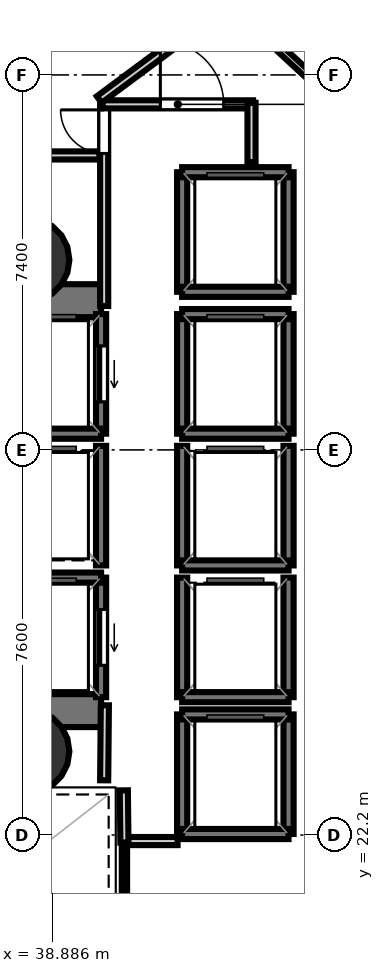
"""IFC4 building model, lengths in metres.
Left out: names, types, materials, properties, quantities, classifications, styles, units other than length and angle.
Written with IfcOpenShell. Run it as: python <this file> out.ifc"""

import sys

from ifc_helpers import new_model, si_unit, direction, frame, frame_2d, origin, origin_2d, place, context, subcontext, project, spatial, rectangle, hollow_circle, extrude, element, fill, save


model = new_model("IFC4")
c1 = context("Model", 3, precision=1e-05, world=origin(), true_north=direction((0.0, 1.0)))
c2 = subcontext(c1, "Body", "Model", "MODEL_VIEW")
j1 = project(units=[si_unit("LENGTHUNIT", "METRE"), si_unit("PLANEANGLEUNIT", "RADIAN")], contexts=[c1])
p1 = place(None, origin())
s1 = spatial("IfcSite", under=j1, at=p1, CompositionType="ELEMENT")
p2 = place(p1, origin())
s2 = spatial("IfcBuilding", under=s1, at=p2, CompositionType="ELEMENT")
p3 = place(p2, frame((0.0, 0.0, 67.3)))
s3 = spatial("IfcBuildingStorey", under=s2, at=p3, CompositionType="ELEMENT", Elevation=67.3)
p4 = place(p3, frame((29.13, 32.745, 0.0), z_axis=(0.0, 0.0, 1.0), x_axis=(1.0, 0.0, 0.0)))
e1 = element("IfcWall", 1, at=p4, inside=s3, PredefinedType="SHEAR", context=c2, shape_type="SweptSolid", body=[
    extrude(rectangle(XDim=10.72, YDim=0.65, at=frame_2d((5.36, 0.0))), origin(), (0.0, 0.0, 1.0), 3.52),
])
p5 = place(p4, frame((1.095, 0.0, 0.0)))
e2 = element("IfcOpeningElement", 2, at=p5, cuts=e1, PredefinedType="OPENING", context=c2, shape_type="SweptSolid", body=[
    extrude(rectangle(XDim=1.25, YDim=2.15, at=frame_2d((0.625, 1.075))), frame((0.0, 0.335, 0.0), z_axis=(0.0, -1.0, 0.0), x_axis=(1.0, 0.0, 0.0)), (0.0, 0.0, 1.0), 0.67),
])
p6 = place(p3, frame((29.13, 24.655, 0.0), z_axis=(0.0, 0.0, 1.0), x_axis=(1.0, 0.0, 0.0)))
e3 = element("IfcWall", 3, at=p6, inside=s3, PredefinedType="SHEAR", context=c2, shape_type="SweptSolid", body=[
    extrude(rectangle(XDim=10.72, YDim=0.65, at=frame_2d((5.36, 0.0))), origin(), (0.0, 0.0, 1.0), 3.52),
])
p7 = place(p6, frame((0.895, 0.0, 0.0)))
e4 = element("IfcOpeningElement", 4, at=p7, cuts=e3, PredefinedType="OPENING", context=c2, shape_type="SweptSolid", body=[
    extrude(rectangle(XDim=1.25, YDim=2.15, at=frame_2d((0.625, 1.075))), frame((0.0, 0.335, 0.0), z_axis=(0.0, -1.0, 0.0), x_axis=(1.0, 0.0, 0.0)), (0.0, 0.0, 1.0), 0.67),
])
for number, where, z_axis, x_axis in (
    (5, (38.4, 33.55, 0.0), (0.0, 0.0, 1.0), (1.0, 0.0, 0.0)),
    (6, (38.4, 23.85, 0.0), (0.0, 0.0, 1.0), (1.0, 0.0, 0.0)),
):
    element("IfcColumn", number, at=place(p3, frame(where, z_axis=z_axis, x_axis=x_axis)), inside=s3, PredefinedType="COLUMN", context=c2, shape_type="SweptSolid", body=[
        extrude(hollow_circle(Radius=0.825, WallThickness=0.04, at=origin_2d()), origin(), (0.0, 0.0, 1.0), 3.7),
    ])
p8 = place(p3, frame((39.85, 30.12, 0.0), z_axis=(0.0, 0.0, 1.0), x_axis=(0.0, 1.0, 0.0)))
e7 = element("IfcWall", 7, at=p8, inside=s3, PredefinedType="SOLIDWALL", context=c2, shape_type="SweptSolid", body=[
    extrude(rectangle(XDim=2.36, YDim=0.2, at=frame_2d((1.18, 0.0))), origin(), (0.0, 0.0, 1.0), 3.52),
])
p9 = place(p8, frame((0.63, 0.0, 0.0)))
e8 = element("IfcOpeningElement", 8, at=p9, cuts=e7, PredefinedType="OPENING", context=c2, shape_type="SweptSolid", body=[
    extrude(rectangle(XDim=1.1, YDim=2.15, at=frame_2d((0.55, 1.075))), frame((0.0, 0.11, 0.0), z_axis=(0.0, -1.0, 0.0), x_axis=(1.0, 0.0, 0.0)), (0.0, 0.0, 1.0), 0.22),
])
p10 = place(p3, frame((37.75, 30.12, 0.0), z_axis=(0.0, 0.0, 1.0), x_axis=(1.0, 0.0, 0.0)))
e9 = element("IfcWall", 9, at=p10, inside=s3, PredefinedType="SOLIDWALL", context=c2, shape_type="SweptSolid", body=[
    extrude(rectangle(XDim=2.1, YDim=0.2, at=frame_2d((1.05, 0.0))), origin(), (0.0, 0.0, 1.0), 3.52),
])
p11 = place(p3, frame((39.85, 24.92, 0.0), z_axis=(0.0, 0.0, 1.0), x_axis=(0.0, 1.0, 0.0)))
e10 = element("IfcWall", 10, at=p11, inside=s3, PredefinedType="SOLIDWALL", context=c2, shape_type="SweptSolid", body=[
    extrude(rectangle(XDim=2.36, YDim=0.2, at=frame_2d((1.18, 0.0))), origin(), (0.0, 0.0, 1.0), 3.52),
])
p12 = place(p11, frame((0.63, 0.0, 0.0)))
e11 = element("IfcOpeningElement", 11, at=p12, cuts=e10, PredefinedType="OPENING", context=c2, shape_type="SweptSolid", body=[
    extrude(rectangle(XDim=1.1, YDim=2.15, at=frame_2d((0.55, 1.075))), frame((0.0, 0.11, 0.0), z_axis=(0.0, -1.0, 0.0), x_axis=(1.0, 0.0, 0.0)), (0.0, 0.0, 1.0), 0.22),
])
p13 = place(p3, frame((37.75, 27.28, 0.0), z_axis=(0.0, 0.0, 1.0), x_axis=(1.0, 0.0, 0.0)))
e12 = element("IfcWall", 12, at=p13, inside=s3, PredefinedType="SOLIDWALL", context=c2, shape_type="SweptSolid", body=[
    extrude(rectangle(XDim=2.1, YDim=0.2, at=frame_2d((1.05, 0.0))), origin(), (0.0, 0.0, 1.0), 3.52),
])
for number, where, z_axis, x_axis in (
    (13, (43.55, 30.12, 0.0), (0.0, 0.0, 1.0), (0.0, 1.0, 0.0)),
    (14, (41.45, 30.12, 0.0), (0.0, 0.0, 1.0), (0.0, 1.0, 0.0)),
):
    element("IfcWall", number, at=place(p3, frame(where, z_axis=z_axis, x_axis=x_axis)), inside=s3, PredefinedType="SOLIDWALL", context=c2, shape_type="SweptSolid", body=[
        extrude(rectangle(XDim=2.36, YDim=0.2, at=frame_2d((1.18, 0.0))), origin(), (0.0, 0.0, 1.0), 3.52),
    ])
for number, where, z_axis, x_axis in (
    (15, (41.45, 32.48, 0.0), (0.0, 0.0, 1.0), (1.0, 0.0, 0.0)),
    (16, (41.45, 30.12, 0.0), (0.0, 0.0, 1.0), (1.0, 0.0, 0.0)),
):
    element("IfcWall", number, at=place(p3, frame(where, z_axis=z_axis, x_axis=x_axis)), inside=s3, PredefinedType="SOLIDWALL", context=c2, shape_type="SweptSolid", body=[
        extrude(rectangle(XDim=2.1, YDim=0.2, at=frame_2d((1.05, 0.0))), origin(), (0.0, 0.0, 1.0), 3.52),
    ])
for number, where, z_axis, x_axis in (
    (17, (43.55, 27.52, 0.0), (0.0, 0.0, 1.0), (0.0, 1.0, 0.0)),
    (18, (41.45, 27.52, 0.0), (0.0, 0.0, 1.0), (0.0, 1.0, 0.0)),
):
    element("IfcWall", number, at=place(p3, frame(where, z_axis=z_axis, x_axis=x_axis)), inside=s3, PredefinedType="SOLIDWALL", context=c2, shape_type="SweptSolid", body=[
        extrude(rectangle(XDim=2.36, YDim=0.2, at=frame_2d((1.18, 0.0))), origin(), (0.0, 0.0, 1.0), 3.52),
    ])
p14 = place(p3, frame((41.45, 27.52, 0.0), z_axis=(0.0, 0.0, 1.0), x_axis=(1.0, 0.0, 0.0)))
e19 = element("IfcWall", 19, at=p14, inside=s3, PredefinedType="SOLIDWALL", context=c2, shape_type="SweptSolid", body=[
    extrude(rectangle(XDim=2.1, YDim=0.2, at=frame_2d((1.05, 0.0))), origin(), (0.0, 0.0, 1.0), 3.52),
])
for number, where, z_axis, x_axis in (
    (20, (43.55, 24.92, 0.0), (0.0, 0.0, 1.0), (0.0, 1.0, 0.0)),
    (21, (41.45, 24.92, 0.0), (0.0, 0.0, 1.0), (0.0, 1.0, 0.0)),
):
    element("IfcWall", number, at=place(p3, frame(where, z_axis=z_axis, x_axis=x_axis)), inside=s3, PredefinedType="SOLIDWALL", context=c2, shape_type="SweptSolid", body=[
        extrude(rectangle(XDim=2.36, YDim=0.2, at=frame_2d((1.18, 0.0))), origin(), (0.0, 0.0, 1.0), 3.52),
    ])
p15 = place(p3, frame((41.45, 24.92, 0.0), z_axis=(0.0, 0.0, 1.0), x_axis=(1.0, 0.0, 0.0)))
e22 = element("IfcWall", 22, at=p15, inside=s3, PredefinedType="SOLIDWALL", context=c2, shape_type="SweptSolid", body=[
    extrude(rectangle(XDim=2.1, YDim=0.2, at=frame_2d((1.05, 0.0))), origin(), (0.0, 0.0, 1.0), 3.52),
])
p16 = place(p3, frame((39.85, 27.52, 0.0), z_axis=(0.0, 0.0, 1.0), x_axis=(0.0, 1.0, 0.0)))
e23 = element("IfcWall", 23, at=p16, inside=s3, PredefinedType="SOLIDWALL", context=c2, shape_type="SweptSolid", body=[
    extrude(rectangle(XDim=2.36, YDim=0.2, at=frame_2d((1.18, 0.0))), origin(), (0.0, 0.0, 1.0), 3.52),
])
for number, where, z_axis, x_axis in (
    (24, (43.55, 22.22, 0.0), (0.0, 0.0, 1.0), (0.0, 1.0, 0.0)),
    (25, (41.45, 22.22, 0.0), (0.0, 0.0, 1.0), (0.0, 1.0, 0.0)),
):
    element("IfcWall", number, at=place(p3, frame(where, z_axis=z_axis, x_axis=x_axis)), inside=s3, PredefinedType="SOLIDWALL", context=c2, shape_type="SweptSolid", body=[
        extrude(rectangle(XDim=2.36, YDim=0.2, at=frame_2d((1.18, 0.0))), origin(), (0.0, 0.0, 1.0), 3.52),
    ])
for number, where, z_axis, x_axis in (
    (26, (41.45, 24.58, 0.0), (0.0, 0.0, 1.0), (1.0, 0.0, 0.0)),
    (27, (41.45, 22.22, 0.0), (0.0, 0.0, 1.0), (1.0, 0.0, 0.0)),
):
    element("IfcWall", number, at=place(p3, frame(where, z_axis=z_axis, x_axis=x_axis)), inside=s3, PredefinedType="SOLIDWALL", context=c2, shape_type="SweptSolid", body=[
        extrude(rectangle(XDim=2.1, YDim=0.2, at=frame_2d((1.05, 0.0))), origin(), (0.0, 0.0, 1.0), 3.52),
    ])
for number, where, z_axis, x_axis in (
    (28, (43.55, 32.92, 0.0), (0.0, 0.0, 1.0), (0.0, 1.0, 0.0)),
    (29, (41.45, 32.92, 0.0), (0.0, 0.0, 1.0), (0.0, 1.0, 0.0)),
):
    element("IfcWall", number, at=place(p3, frame(where, z_axis=z_axis, x_axis=x_axis)), inside=s3, PredefinedType="SOLIDWALL", context=c2, shape_type="SweptSolid", body=[
        extrude(rectangle(XDim=2.36, YDim=0.2, at=frame_2d((1.18, 0.0))), origin(), (0.0, 0.0, 1.0), 3.52),
    ])
for number, where, z_axis, x_axis in (
    (30, (41.45, 35.28, 0.0), (0.0, 0.0, 1.0), (1.0, 0.0, 0.0)),
    (31, (41.45, 32.92, 0.0), (0.0, 0.0, 1.0), (1.0, 0.0, 0.0)),
):
    element("IfcWall", number, at=place(p3, frame(where, z_axis=z_axis, x_axis=x_axis)), inside=s3, PredefinedType="SOLIDWALL", context=c2, shape_type="SweptSolid", body=[
        extrude(rectangle(XDim=2.1, YDim=0.2, at=frame_2d((1.05, 0.0))), origin(), (0.0, 0.0, 1.0), 3.52),
    ])
p17 = place(p3, frame((39.911, 32.64, 0.0), z_axis=(0.0, 0.0, 1.0), x_axis=(0.0, 1.0, 0.0)))
e32 = element("IfcWall", 32, at=p17, inside=s3, PredefinedType="PARTITIONING", context=c2, shape_type="SweptSolid", body=[
    extrude(rectangle(XDim=4.01, YDim=0.16, at=frame_2d((2.005, 0.0))), origin(), (0.0, 0.0, 1.0), 2.84),
])
p18 = place(p17, frame((3.01, 0.0, 0.0)))
e33 = element("IfcOpeningElement", 33, at=p18, cuts=e32, PredefinedType="OPENING", context=c2, shape_type="SweptSolid", body=[
    extrude(rectangle(XDim=0.86, YDim=2.05, at=frame_2d((0.43, 1.025))), frame((0.0, 0.09, 0.0), z_axis=(0.0, -1.0, 0.0), x_axis=(1.0, 0.0, 0.0)), (0.0, 0.0, 1.0), 0.18),
])
p19 = place(p3, frame((39.88, 36.619, 0.0), z_axis=(0.0, 0.0, 1.0), x_axis=(1.0, 0.0, 0.0)))
e34 = element("IfcWall", 34, at=p19, inside=s3, PredefinedType="PARTITIONING", context=c2, shape_type="SweptSolid", body=[
    extrude(rectangle(XDim=2.97, YDim=0.16, at=frame_2d((1.485, 0.0))), origin(), (0.0, 0.0, 1.0), 2.798),
])
p20 = place(p19, frame((1.14, 0.0, 0.0)))
e35 = element("IfcOpeningElement", 35, at=p20, cuts=e34, PredefinedType="OPENING", context=c2, shape_type="SweptSolid", body=[
    extrude(rectangle(XDim=1.25, YDim=2.2, at=frame_2d((0.625, 1.1))), frame((0.0, 0.09, 0.0), z_axis=(0.0, -1.0, 0.0), x_axis=(1.0, 0.0, 0.0)), (0.0, 0.0, 1.0), 0.18),
])
p21 = place(p3, frame((42.819, 36.65, 0.0), z_axis=(0.0, 0.0, 1.0), x_axis=(0.0, -1.0, 0.0)))
e36 = element("IfcWall", 36, at=p21, inside=s3, PredefinedType="PARTITIONING", context=c2, shape_type="SweptSolid", body=[
    extrude(rectangle(XDim=1.17, YDim=0.16, at=frame_2d((0.585, 0.0))), origin(), (0.0, 0.0, 1.0), 2.798),
])
p22 = place(p3, frame((41.36, 22.081, 0.0), z_axis=(0.0, 0.0, 1.0), x_axis=(-1.0, 0.0, 0.0)))
e37 = element("IfcWall", 37, at=p22, inside=s3, PredefinedType="PARTITIONING", context=c2, shape_type="SweptSolid", body=[
    extrude(rectangle(XDim=1.08, YDim=0.16, at=frame_2d((0.54, 0.0))), origin(), (0.0, 0.0, 1.0), 2.84),
])
p23 = place(p3, frame((40.311, 22.05, 0.0), z_axis=(0.0, 0.0, 1.0), x_axis=(-0.011836292006, 0.999929948642, 0.0)))
e38 = element("IfcWall", 38, at=p23, inside=s3, PredefinedType="PARTITIONING", context=c2, shape_type="SweptSolid", body=[
    extrude(rectangle(XDim=1.031, YDim=0.16, at=frame_2d((0.516, 0.0))), origin(), (0.0, 0.0, 1.0), 2.84),
])
p24 = place(p3, frame((39.911, 23.28, 0.0), z_axis=(0.0, 0.0, 1.0), x_axis=(0.009397771291, 0.999955839972, 0.0)))
e39 = element("IfcWall", 39, at=p24, inside=s3, PredefinedType="PARTITIONING", context=c2, shape_type="SweptSolid", body=[
    extrude(rectangle(XDim=1.481, YDim=0.16, at=frame_2d((0.74, 0.0))), origin(), (0.0, 0.0, 1.0), 2.84),
])
p25 = place(p3, frame((42.879, 38.991, 0.0), z_axis=(0.0, 0.0, 1.0), x_axis=(-0.802814676043, -0.596228644003, 0.0)))
e40 = element("IfcWall", 40, at=p25, inside=s3, PredefinedType="PARTITIONING", context=c2, shape_type="SweptSolid", body=[
    extrude(rectangle(XDim=3.818, YDim=0.16, at=frame_2d((1.909, 0.0))), origin(), (0.0, 0.0, 1.0), 2.798),
])
p26 = place(p3, frame((39.818, 35.611, 0.0), z_axis=(0.0, 0.0, 1.0), x_axis=(-1.0, 0.0, 0.0)))
e41 = element("IfcWall", 41, at=p26, inside=s3, PredefinedType="PARTITIONING", context=c2, shape_type="SweptSolid", body=[
    extrude(rectangle(XDim=5.318, YDim=0.16, at=frame_2d((2.659, 0.0))), origin(), (0.0, 0.0, 1.0), 2.84),
])
p27 = place(p3, frame((36.167, 44.385, 0.0), z_axis=(0.0, 0.0, 1.0), x_axis=(0.734284800638, -0.678841536408, 0.0)))
e42 = element("IfcWall", 42, at=p27, inside=s3, PredefinedType="PARTITIONING", context=c2, shape_type="SweptSolid", body=[
    extrude(rectangle(XDim=31.198, YDim=0.14, at=frame_2d((15.599, 0.0))), origin(), (0.0, 0.0, 1.0), 2.798),
])
p28 = place(p3, frame((40.311, 18.0, 0.0), z_axis=(0.0, 0.0, 1.0), x_axis=(0.0, 1.0, 0.0)))
e43 = element("IfcWall", 43, at=p28, inside=s3, PredefinedType="PARTITIONING", context=c2, shape_type="SweptSolid", body=[
    extrude(rectangle(XDim=3.97, YDim=0.105, at=frame_2d((1.985, 0.0))), origin(), (0.0, 0.0, 1.0), 2.84),
])
p29 = place(p9, origin())
e44 = element("IfcDoor", 44, at=p29, inside=s3, OperationType="SLIDING_TO_LEFT", PredefinedType="DOOR", context=c2, shape_type="SweptSolid", body=[
    extrude(rectangle(XDim=1.1, YDim=2.15, at=frame_2d((0.55, 1.075))), frame((0.0, 0.025, 0.0), z_axis=(0.0, -1.0, 0.0), x_axis=(1.0, 0.0, 0.0)), (0.0, 0.0, 1.0), 0.05),
])
fill(e8, e44)
p30 = place(p12, origin())
e45 = element("IfcDoor", 45, at=p30, inside=s3, OperationType="SLIDING_TO_LEFT", PredefinedType="DOOR", context=c2, shape_type="SweptSolid", body=[
    extrude(rectangle(XDim=1.1, YDim=2.15, at=frame_2d((0.55, 1.075))), frame((0.0, 0.025, 0.0), z_axis=(0.0, -1.0, 0.0), x_axis=(1.0, 0.0, 0.0)), (0.0, 0.0, 1.0), 0.05),
])
fill(e11, e45)
p31 = place(p18, origin())
e46 = element("IfcDoor", 46, at=p31, inside=s3, OperationType="SINGLE_SWING_RIGHT", PredefinedType="DOOR", context=c2, shape_type="SweptSolid", body=[
    extrude(rectangle(XDim=0.86, YDim=2.05, at=frame_2d((0.43, 1.025))), frame((0.0, 0.025, 0.0), z_axis=(0.0, -1.0, 0.0), x_axis=(1.0, 0.0, 0.0)), (0.0, 0.0, 1.0), 0.05),
])
fill(e33, e46)
p32 = place(p20, origin())
e47 = element("IfcDoor", 47, at=p32, inside=s3, OperationType="SINGLE_SWING_LEFT", PredefinedType="DOOR", context=c2, shape_type="SweptSolid", body=[
    extrude(rectangle(XDim=1.25, YDim=2.2, at=frame_2d((0.625, 1.1))), frame((0.0, 0.025, 0.0), z_axis=(0.0, -1.0, 0.0), x_axis=(1.0, 0.0, 0.0)), (0.0, 0.0, 1.0), 0.05),
])
fill(e35, e47)
save(model, sys.argv[1])
